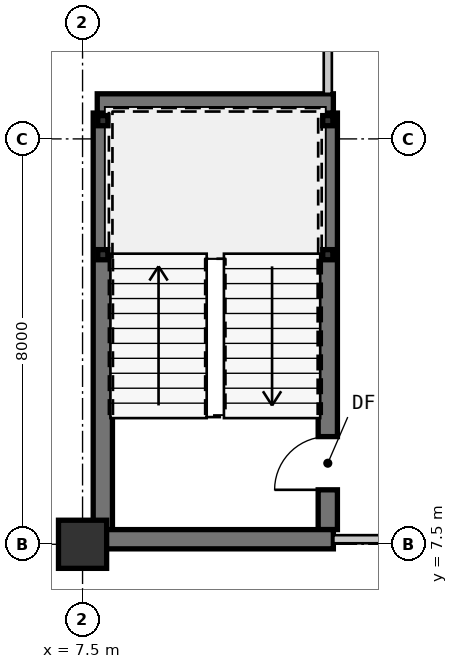
"""IFC4 building model, lengths in metres.
Left out: names, types, materials, properties, quantities, classifications, styles, units other than length and angle.
Written with IfcOpenShell. Run it as: python <this file> out.ifc"""

import sys

from ifc_helpers import new_model, si_unit, direction, frame, frame_2d, origin, origin_2d, place, context, subcontext, project, spatial, rectangle, hollow_rectangle, extrude, source, transform, mapped, element, fill, save


model = new_model("IFC4")
c1 = context("Model", 3, precision=1e-05, world=origin(), true_north=direction((0.0, 1.0)))
c2 = subcontext(c1, "Body", "Model", "MODEL_VIEW")
j1 = project(units=[si_unit("LENGTHUNIT", "METRE"), si_unit("PLANEANGLEUNIT", "RADIAN")], contexts=[c1])
p1 = place(None, origin())
s1 = spatial("IfcSite", under=j1, at=p1, CompositionType="ELEMENT")
p2 = place(p1, origin())
s2 = spatial("IfcBuilding", under=s1, at=p2, CompositionType="ELEMENT")
p3 = place(p2, frame((0.0, 0.0, -4.0)))
s3 = spatial("IfcBuildingStorey", under=s2, at=p3, CompositionType="ELEMENT", Elevation=-4.0)
m1 = source(origin(), c2, "Body", "SweptSolid", [
    extrude(rectangle(XDim=0.95, YDim=0.95, at=origin_2d()), origin(), (0.0, 0.0, 1.0), 4.0),
])
p4 = place(p3, frame((7.5, 7.5, 0.0), z_axis=(0.0, 0.0, 1.0), x_axis=(1.0, 0.0, 0.0)))
e1 = element("IfcColumn", 1, at=p4, inside=s3, PredefinedType="COLUMN", context=c2, shape_type="MappedRepresentation", body=[
    mapped(m1, transform((0.0, 0.0, 0.0), scale=1.0)),
])
m2 = source(origin(), c2, "Body", "SweptSolid", [
    extrude(hollow_rectangle(XDim=0.2, YDim=0.2, WallThickness=0.009, at=origin_2d()), origin(), (0.0, 0.0, 1.0), 4.0),
])
for number, where, z_axis, x_axis in (
    (2, (7.9, 13.215, 0.0), (0.0, 0.0, 1.0), (1.0, 0.0, 0.0)),
    (3, (12.34, 13.215, 0.0), (0.0, 0.0, 1.0), (1.0, 0.0, 0.0)),
    (4, (7.9, 15.86, 0.0), (0.0, 0.0, 1.0), (1.0, 0.0, 0.0)),
    (5, (12.34, 15.86, 0.0), (0.0, 0.0, 1.0), (1.0, 0.0, 0.0)),
):
    element("IfcColumn", number, at=place(p3, frame(where, z_axis=z_axis, x_axis=x_axis)), inside=s3, PredefinedType="COLUMN", context=c2, shape_type="MappedRepresentation", body=[
        mapped(m2, transform((0.0, 0.0, 0.0), scale=1.0)),
    ])
m3 = source(origin(), c2, "Body", "SweptSolid", [
    extrude(rectangle(XDim=8.22, YDim=0.38, at=frame_2d((4.11, 0.0))), origin(), (0.0, 0.0, 1.0), 3.74),
])
p5 = place(p3, frame((12.34, 16.01, 0.0), z_axis=(0.0, 0.0, 1.0), x_axis=(0.0, -1.0, 0.0)))
e6 = element("IfcWall", 6, at=p5, inside=s3, PredefinedType="SHEAR", context=c2, shape_type="MappedRepresentation", body=[
    mapped(m3, transform((0.0, 0.0, 0.0), scale=1.0)),
])
m4 = source(origin(), c2, "Body", "SweptSolid", [
    extrude(rectangle(XDim=1.05, YDim=2.1, at=frame_2d((0.525, 1.05))), frame((0.0, 0.2, 0.0), z_axis=(0.0, -1.0, 0.0), x_axis=(1.0, 0.0, 0.0)), (0.0, 0.0, 1.0), 0.4),
])
p6 = place(p5, frame((6.385, 0.0, 0.0)))
e7 = element("IfcOpeningElement", 7, at=p6, cuts=e6, PredefinedType="OPENING", context=c2, shape_type="MappedRepresentation", body=[
    mapped(m4, transform((0.0, 0.0, 0.0), scale=1.0)),
])
p7 = place(p3, frame((7.9, 7.79, 0.0), z_axis=(0.0, 0.0, 1.0), x_axis=(0.0, 1.0, 0.0)))
e8 = element("IfcWall", 8, at=p7, inside=s3, PredefinedType="SHEAR", context=c2, shape_type="MappedRepresentation", body=[
    mapped(m3, transform((0.0, 0.0, 0.0), scale=1.0)),
])
m5 = source(origin(), c2, "Body", "SweptSolid", [
    extrude(rectangle(XDim=4.66, YDim=0.38, at=frame_2d((2.33, 0.0))), origin(), (0.0, 0.0, 1.0), 3.74),
])
for number, where, z_axis, x_axis in (
    (9, (7.79, 16.2, 0.0), (0.0, 0.0, 1.0), (1.0, 0.0, 0.0)),
    (10, (12.45, 7.6, 0.0), (0.0, 0.0, 1.0), (-1.0, 0.0, 0.0)),
):
    element("IfcWall", number, at=place(p3, frame(where, z_axis=z_axis, x_axis=x_axis)), inside=s3, PredefinedType="SHEAR", context=c2, shape_type="MappedRepresentation", body=[
        mapped(m5, transform((0.0, 0.0, 0.0), scale=1.0)),
    ])
m6 = source(origin(), c2, "Body", "SweptSolid", [
    extrude(rectangle(XDim=5.03, YDim=0.16, at=frame_2d((2.515, 0.0))), origin(), (0.0, 0.0, 1.0), 3.74),
])
p8 = place(p3, frame((12.34, 16.39, 0.0), z_axis=(0.0, 0.0, 1.0), x_axis=(0.0, 1.0, 0.0)))
e11 = element("IfcWall", 11, at=p8, inside=s3, PredefinedType="PARTITIONING", context=c2, shape_type="MappedRepresentation", body=[
    mapped(m6, transform((0.0, 0.0, 0.0), scale=1.0)),
])
m7 = source(origin(), c2, "Body", "SweptSolid", [
    extrude(rectangle(XDim=2.47, YDim=0.16, at=frame_2d((1.235, 0.0))), origin(), (0.0, 0.0, 1.0), 3.74),
])
p9 = place(p3, frame((14.92, 7.6, 0.0), z_axis=(0.0, 0.0, 1.0), x_axis=(-1.0, 0.0, 0.0)))
e12 = element("IfcWall", 12, at=p9, inside=s3, PredefinedType="PARTITIONING", context=c2, shape_type="MappedRepresentation", body=[
    mapped(m7, transform((0.0, 0.0, 0.0), scale=1.0)),
])
m8 = source(origin(), c2, "Body", "SweptSolid", [
    extrude(rectangle(XDim=1.05, YDim=2.1, at=frame_2d((0.525, 1.05))), frame((0.0, 0.025, 0.0), z_axis=(0.0, -1.0, 0.0), x_axis=(1.0, 0.0, 0.0)), (0.0, 0.0, 1.0), 0.05),
])
p10 = place(p6, frame((1.05, 0.0, 0.0), z_axis=(0.0, 0.0, 1.0), x_axis=(-1.0, 0.0, 0.0)))
e13 = element("IfcDoor", 13, at=p10, inside=s3, OperationType="SINGLE_SWING_LEFT", PredefinedType="DOOR", context=c2, shape_type="MappedRepresentation", body=[
    mapped(m8, transform((0.0, 0.0, 0.0), scale=1.0)),
])
fill(e7, e13)
save(model, sys.argv[1])
